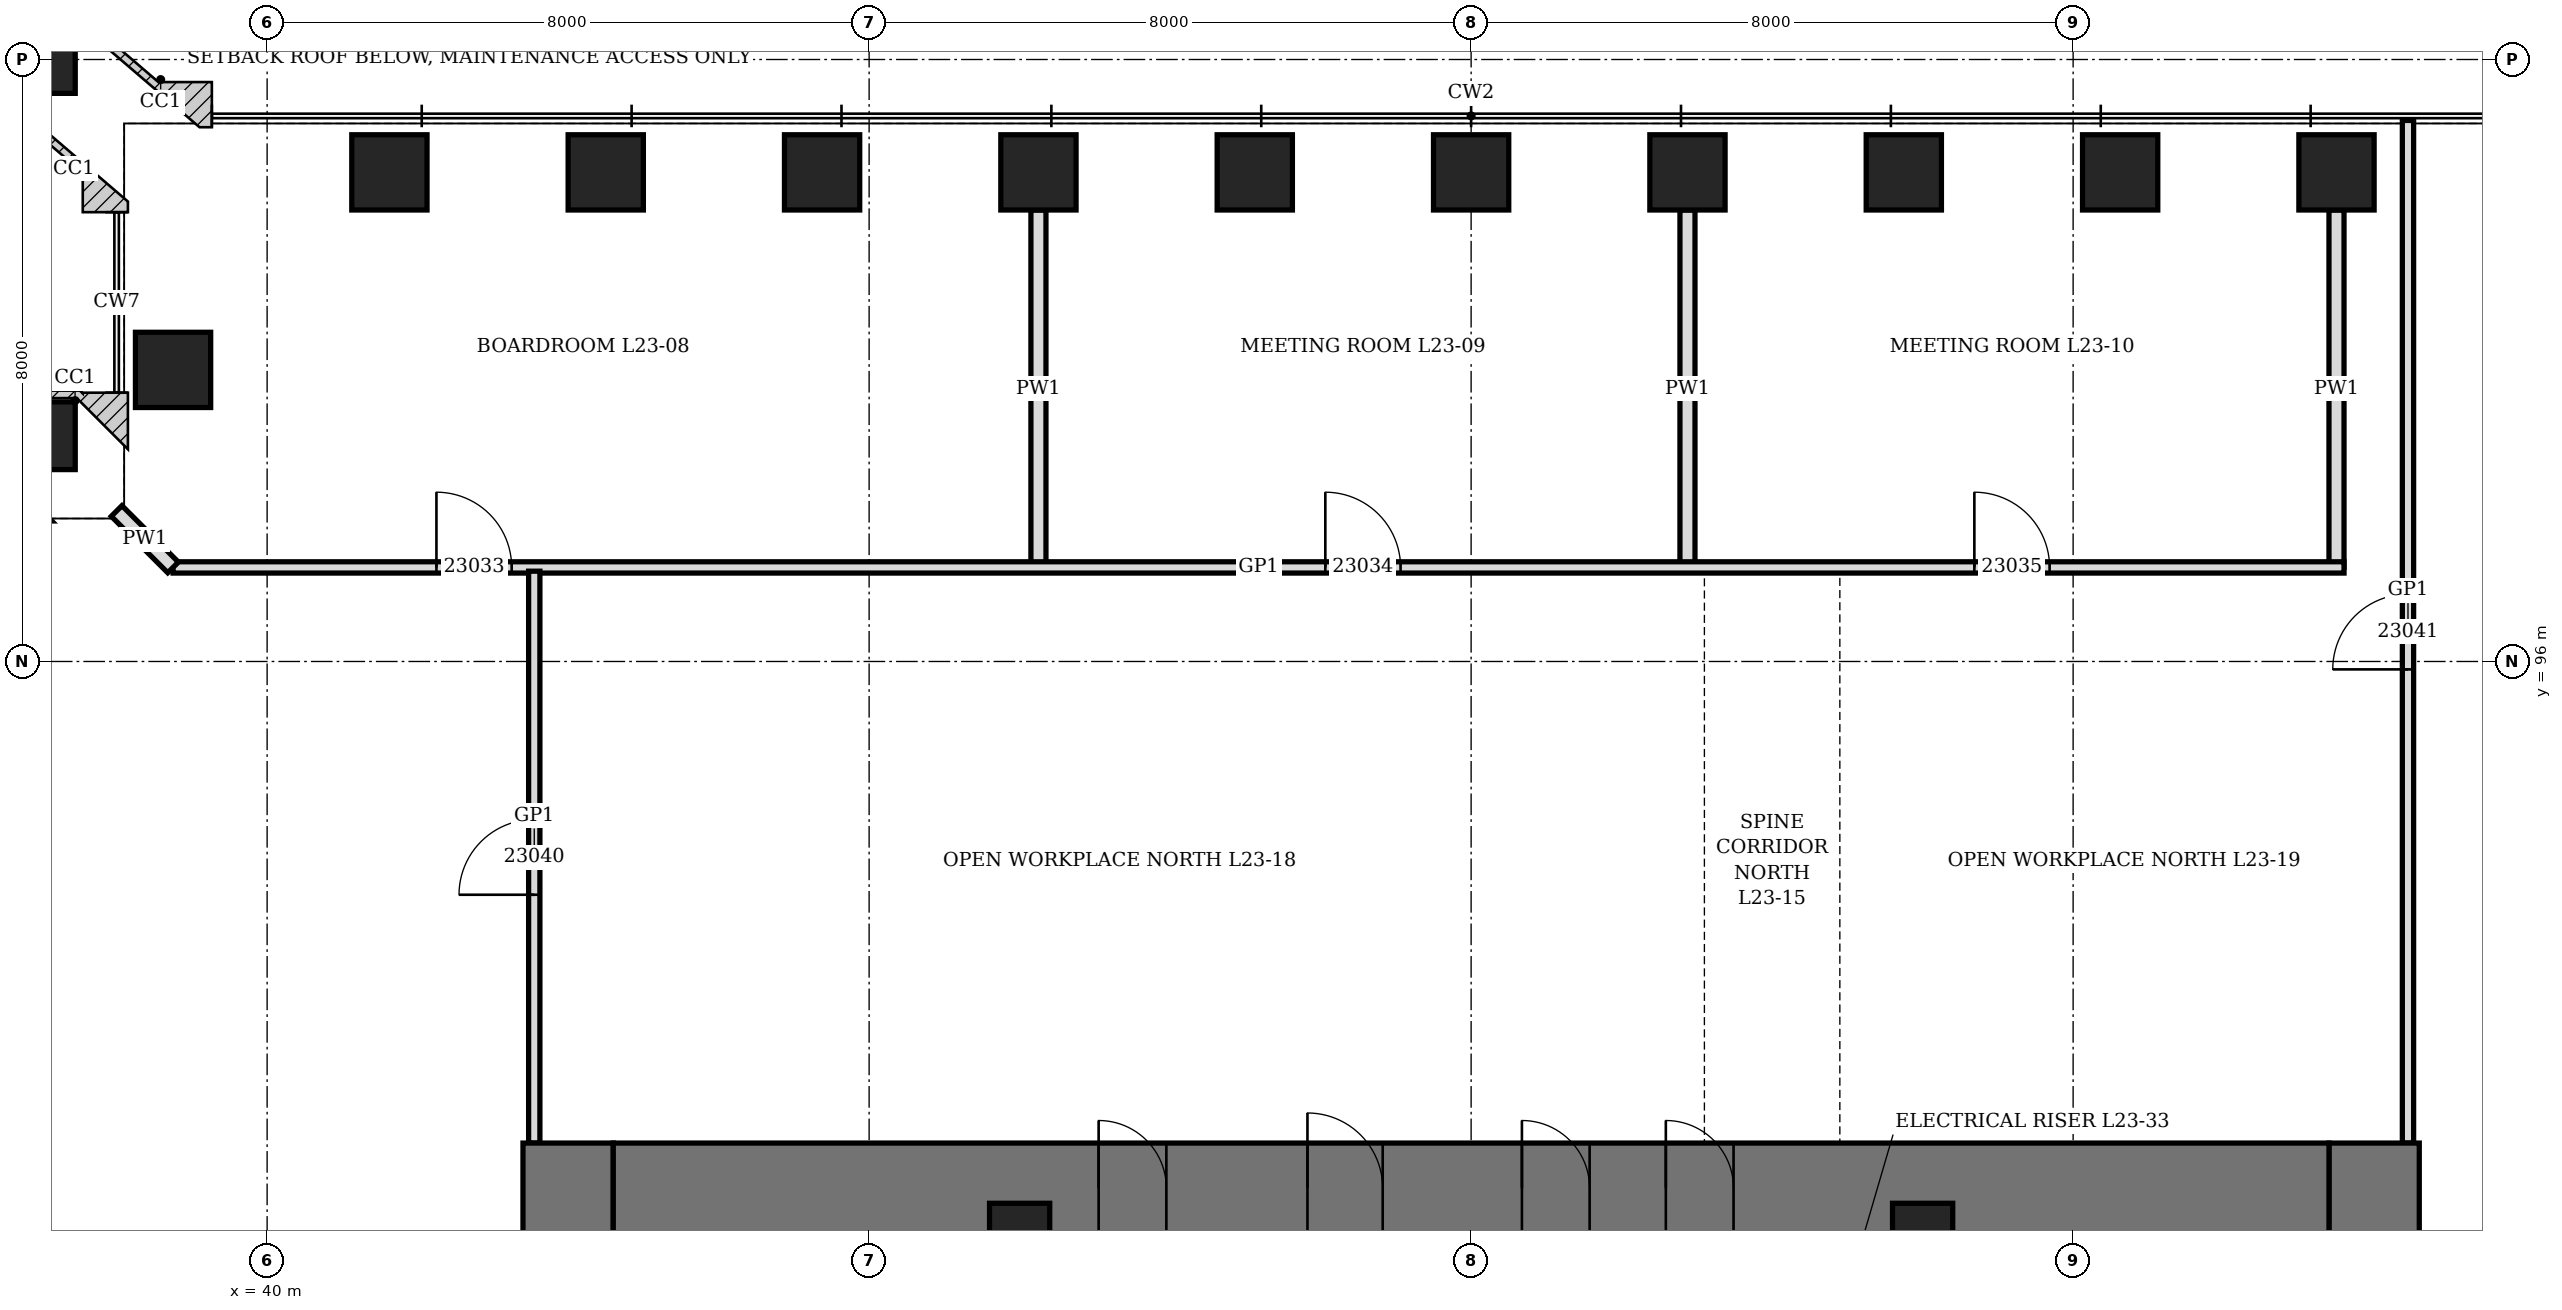
"""IFC4 building model, lengths in metres.
Left out: names, types, materials, properties, quantities, classifications, styles, units other than length and angle.
Written with IfcOpenShell. Run it as: python <this file> out.ifc"""

import sys

from ifc_helpers import new_model, si_unit, direction, frame, frame_2d, origin, origin_2d, place, context, subcontext, project, spatial, rectangle, hollow_rectangle, extrude, clip, halfspace, element, fill, save


model = new_model("IFC4")
c1 = context("Model", 3, precision=1e-05, world=origin(), true_north=direction((0.0, 1.0)))
c2 = subcontext(c1, "Body", "Model", "MODEL_VIEW")
j1 = project(units=[si_unit("LENGTHUNIT", "METRE"), si_unit("PLANEANGLEUNIT", "RADIAN")], contexts=[c1])
p1 = place(None, origin())
s1 = spatial("IfcSite", under=j1, at=p1, CompositionType="ELEMENT")
p2 = place(p1, origin())
s2 = spatial("IfcBuilding", under=s1, at=p2, CompositionType="ELEMENT")
p3 = place(p2, frame((0.0, 0.0, 108.1)))
s3 = spatial("IfcBuildingStorey", under=s2, at=p3, CompositionType="ELEMENT", Elevation=108.1)
for number, where, z_axis, x_axis in (
    (1, (67.5, 102.5, -0.25), (0.0, 0.0, 1.0), (1.0, 0.0, 0.0)),
    (2, (64.625, 102.5, -0.25), (0.0, 0.0, 1.0), (1.0, 0.0, 0.0)),
    (3, (61.75, 102.5, -0.25), (0.0, 0.0, 1.0), (1.0, 0.0, 0.0)),
    (4, (58.875, 102.5, -0.25), (0.0, 0.0, 1.0), (1.0, 0.0, 0.0)),
    (5, (56.0, 102.5, -0.25), (0.0, 0.0, 1.0), (1.0, 0.0, 0.0)),
    (6, (53.125, 102.5, -0.25), (0.0, 0.0, 1.0), (1.0, 0.0, 0.0)),
    (7, (50.25, 102.5, -0.25), (0.0, 0.0, 1.0), (1.0, 0.0, 0.0)),
    (8, (47.375, 102.5, -0.25), (0.0, 0.0, 1.0), (1.0, 0.0, 0.0)),
    (9, (44.5, 102.5, -0.25), (0.0, 0.0, 1.0), (1.0, 0.0, 0.0)),
    (10, (41.625, 102.5, -0.25), (0.0, 0.0, 1.0), (1.0, 0.0, 0.0)),
):
    element("IfcColumn", number, at=place(p3, frame(where, z_axis=z_axis, x_axis=x_axis)), inside=s3, PredefinedType="COLUMN", context=c2, shape_type="SweptSolid", body=[
        extrude(hollow_rectangle(XDim=1.0, YDim=1.0, WallThickness=0.35, at=origin_2d()), origin(), (0.0, 0.0, 1.0), 4.45),
    ])
p4 = place(p3, frame((37.0, 104.0, -0.25), z_axis=(0.349200787792, -0.299314960964, 0.887957974202), x_axis=(0.650791373456, 0.759256602365, 0.0)))
e11 = element("IfcColumn", 11, at=p4, inside=s3, PredefinedType="COLUMN", context=c2, shape_type="Clipping", body=[
    clip(clip(extrude(hollow_rectangle(XDim=0.9, YDim=0.9, WallThickness=0.2, at=origin_2d()), origin(), (0.0, 0.0, 1.0), 5.011), halfspace(frame((0.0, 0.0, 0.235), z_axis=(0.0, 0.0, 1.0), x_axis=(1.0, 0.0, 0.0)), True)), halfspace(frame((0.0, 0.0, 4.776), z_axis=(0.0, 0.0, -1.0), x_axis=(1.0, 0.0, 0.0)), True)),
])
p5 = place(p3, frame((38.75, 99.875, -0.25), z_axis=(0.0, 0.0, 1.0), x_axis=(0.0, 1.0, 0.0)))
e12 = element("IfcColumn", 12, at=p5, inside=s3, PredefinedType="COLUMN", context=c2, shape_type="SweptSolid", body=[
    extrude(hollow_rectangle(XDim=1.0, YDim=1.0, WallThickness=0.35, at=origin_2d()), origin(), (0.0, 0.0, 1.0), 4.45),
])
p6 = place(p3, frame((37.0, 99.0, -0.25), z_axis=(0.343685624304, -0.343685624304, 0.873933855216), x_axis=(0.707106781187, 0.707106781187, 0.0)))
e13 = element("IfcColumn", 13, at=p6, inside=s3, PredefinedType="COLUMN", context=c2, shape_type="Clipping", body=[
    clip(clip(extrude(hollow_rectangle(XDim=0.9, YDim=0.9, WallThickness=0.2, at=origin_2d()), origin(), (0.0, 0.0, 1.0), 5.092), halfspace(frame((0.0, 0.0, 0.253), z_axis=(0.0, 0.0, 1.0), x_axis=(1.0, 0.0, 0.0)), True)), halfspace(frame((0.0, 0.0, 4.839), z_axis=(0.0, 0.0, -1.0), x_axis=(1.0, 0.0, 0.0)), True)),
])
p7 = place(p3, frame((44.0, 70.4, 0.0), z_axis=(0.0, 0.0, 1.0), x_axis=(0.0, 1.0, 0.0)))
e14 = element("IfcWall", 14, at=p7, inside=s3, PredefinedType="SHEAR", context=c2, shape_type="SweptSolid", body=[
    extrude(rectangle(XDim=19.2, YDim=1.2, at=frame_2d((9.6, 0.0))), origin(), (0.0, 0.0, 1.0), 4.2),
])
p8 = place(p7, frame((8.6, 0.0, 0.0)))
e15 = element("IfcOpeningElement", 15, at=p8, cuts=e14, PredefinedType="OPENING", context=c2, shape_type="SweptSolid", body=[
    extrude(rectangle(XDim=2.0, YDim=2.4, at=frame_2d((1.0, 1.2))), frame((0.0, 0.61, 0.0), z_axis=(0.0, -1.0, 0.0), x_axis=(1.0, 0.0, 0.0)), (0.0, 0.0, 1.0), 1.22),
])
p9 = place(p3, frame((68.0, 70.4, 0.0), z_axis=(0.0, 0.0, 1.0), x_axis=(0.0, 1.0, 0.0)))
e16 = element("IfcWall", 16, at=p9, inside=s3, PredefinedType="SHEAR", context=c2, shape_type="SweptSolid", body=[
    extrude(rectangle(XDim=19.2, YDim=1.2, at=frame_2d((9.6, 0.0))), origin(), (0.0, 0.0, 1.0), 4.2),
])
p10 = place(p9, frame((8.6, 0.0, 0.0)))
e17 = element("IfcOpeningElement", 17, at=p10, cuts=e16, PredefinedType="OPENING", context=c2, shape_type="SweptSolid", body=[
    extrude(rectangle(XDim=2.0, YDim=2.4, at=frame_2d((1.0, 1.2))), frame((0.0, 0.61, 0.0), z_axis=(0.0, -1.0, 0.0), x_axis=(1.0, 0.0, 0.0)), (0.0, 0.0, 1.0), 1.22),
])
p11 = place(p3, frame((44.6, 89.0, 0.0), z_axis=(0.0, 0.0, 1.0), x_axis=(1.0, 0.0, 0.0)))
e18 = element("IfcWall", 18, at=p11, inside=s3, PredefinedType="SHEAR", context=c2, shape_type="SweptSolid", body=[
    extrude(rectangle(XDim=22.8, YDim=1.2, at=frame_2d((11.4, 0.0))), origin(), (0.0, 0.0, 1.0), 4.2),
])
p12 = place(p11, frame((9.225, 0.0, 0.0)))
e19 = element("IfcOpeningElement", 19, at=p12, cuts=e18, PredefinedType="OPENING", context=c2, shape_type="SweptSolid", body=[
    extrude(rectangle(XDim=1.0, YDim=2.1, at=frame_2d((0.5, 1.05))), frame((0.0, 0.61, 0.0), z_axis=(0.0, -1.0, 0.0), x_axis=(1.0, 0.0, 0.0)), (0.0, 0.0, 1.0), 1.22),
])
p13 = place(p11, frame((6.45, 0.0, 0.0)))
e20 = element("IfcOpeningElement", 20, at=p13, cuts=e18, PredefinedType="OPENING", context=c2, shape_type="SweptSolid", body=[
    extrude(rectangle(XDim=0.9, YDim=2.1, at=frame_2d((0.45, 1.05))), frame((0.0, 0.61, 0.0), z_axis=(0.0, -1.0, 0.0), x_axis=(1.0, 0.0, 0.0)), (0.0, 0.0, 1.0), 1.22),
])
p14 = place(p11, frame((12.075, 0.0, 0.0)))
e21 = element("IfcOpeningElement", 21, at=p14, cuts=e18, PredefinedType="OPENING", context=c2, shape_type="SweptSolid", body=[
    extrude(rectangle(XDim=0.9, YDim=2.1, at=frame_2d((0.45, 1.05))), frame((0.0, 0.61, 0.0), z_axis=(0.0, -1.0, 0.0), x_axis=(1.0, 0.0, 0.0)), (0.0, 0.0, 1.0), 1.22),
])
p15 = place(p11, frame((13.988, 0.0, 0.0)))
e22 = element("IfcOpeningElement", 22, at=p15, cuts=e18, PredefinedType="OPENING", context=c2, shape_type="SweptSolid", body=[
    extrude(rectangle(XDim=0.9, YDim=2.1, at=frame_2d((0.45, 1.05))), frame((0.0, 0.61, 0.0), z_axis=(0.0, -1.0, 0.0), x_axis=(1.0, 0.0, 0.0)), (0.0, 0.0, 1.0), 1.22),
])
for number, where, z_axis, x_axis in (
    (23, (50.0, 88.4, 0.0), (0.0, 0.0, 1.0), (1.0, 0.0, 0.0)),
    (24, (62.0, 88.4, 0.0), (0.0, 0.0, 1.0), (1.0, 0.0, 0.0)),
):
    element("IfcColumn", number, at=place(p3, frame(where, z_axis=z_axis, x_axis=x_axis)), inside=s3, PredefinedType="COLUMN", context=c2, shape_type="SweptSolid", body=[
        extrude(hollow_rectangle(XDim=0.8, YDim=0.8, WallThickness=0.1, at=origin_2d()), origin(), (0.0, 0.0, 1.0), 4.2),
    ])
for number, where, z_axis, x_axis in (
    (25, (50.25, 97.25, 0.0), (0.0, 0.0, 1.0), (0.0, 1.0, 0.0)),
    (26, (58.875, 97.25, 0.0), (0.0, 0.0, 1.0), (0.0, 1.0, 0.0)),
):
    element("IfcWall", number, at=place(p3, frame(where, z_axis=z_axis, x_axis=x_axis)), inside=s3, PredefinedType="PARTITIONING", context=c2, shape_type="SweptSolid", body=[
        extrude(rectangle(XDim=4.75, YDim=0.2, at=frame_2d((2.375, 0.0))), origin(), (0.0, 0.0, 1.0), 3.278),
    ])
p16 = place(p3, frame((67.5, 97.25, 0.0), z_axis=(0.0, 0.0, 1.0), x_axis=(0.0, 1.0, 0.0)))
e27 = element("IfcWall", 27, at=p16, inside=s3, PredefinedType="PARTITIONING", context=c2, shape_type="SweptSolid", body=[
    extrude(rectangle(XDim=4.75, YDim=0.2, at=frame_2d((2.375, 0.0))), origin(), (0.0, 0.0, 1.0), 2.74),
])
p17 = place(p3, frame((38.75, 97.25, 0.0), z_axis=(0.0, 0.0, 1.0), x_axis=(1.0, 0.0, 0.0)))
e28 = element("IfcWall", 28, at=p17, inside=s3, PredefinedType="PARTITIONING", context=c2, shape_type="SweptSolid", body=[
    extrude(rectangle(XDim=28.85, YDim=0.15, at=frame_2d((14.425, 0.0))), origin(), (0.0, 0.0, 1.0), 4.04),
])
p18 = place(p17, frame((3.5, 0.0, 0.0)))
e29 = element("IfcOpeningElement", 29, at=p18, cuts=e28, PredefinedType="OPENING", context=c2, shape_type="SweptSolid", body=[
    extrude(rectangle(XDim=1.0, YDim=2.4, at=frame_2d((0.5, 1.2))), frame((0.0, 0.085, 0.0), z_axis=(0.0, -1.0, 0.0), x_axis=(1.0, 0.0, 0.0)), (0.0, 0.0, 1.0), 0.17),
])
p19 = place(p17, frame((15.312, 0.0, 0.0)))
e30 = element("IfcOpeningElement", 30, at=p19, cuts=e28, PredefinedType="OPENING", context=c2, shape_type="SweptSolid", body=[
    extrude(rectangle(XDim=1.0, YDim=2.4, at=frame_2d((0.5, 1.2))), frame((0.0, 0.085, 0.0), z_axis=(0.0, -1.0, 0.0), x_axis=(1.0, 0.0, 0.0)), (0.0, 0.0, 1.0), 0.17),
])
p20 = place(p17, frame((23.938, 0.0, 0.0)))
e31 = element("IfcOpeningElement", 31, at=p20, cuts=e28, PredefinedType="OPENING", context=c2, shape_type="SweptSolid", body=[
    extrude(rectangle(XDim=1.0, YDim=2.4, at=frame_2d((0.5, 1.2))), frame((0.0, 0.085, 0.0), z_axis=(0.0, -1.0, 0.0), x_axis=(1.0, 0.0, 0.0)), (0.0, 0.0, 1.0), 0.17),
])
p21 = place(p3, frame((43.55, 89.6, 0.0), z_axis=(0.0, 0.0, 1.0), x_axis=(0.0, 1.0, 0.0)))
e32 = element("IfcWall", 32, at=p21, inside=s3, PredefinedType="PARTITIONING", context=c2, shape_type="SweptSolid", body=[
    extrude(rectangle(XDim=7.6, YDim=0.15, at=frame_2d((3.8, 0.0))), origin(), (0.0, 0.0, 1.0), 4.04),
])
p22 = place(p21, frame((3.3, 0.0, 0.0)))
e33 = element("IfcOpeningElement", 33, at=p22, cuts=e32, PredefinedType="OPENING", context=c2, shape_type="SweptSolid", body=[
    extrude(rectangle(XDim=1.0, YDim=2.4, at=frame_2d((0.5, 1.2))), frame((0.0, 0.085, 0.0), z_axis=(0.0, -1.0, 0.0), x_axis=(1.0, 0.0, 0.0)), (0.0, 0.0, 1.0), 0.17),
])
p23 = place(p3, frame((68.45, 89.6, 0.0), z_axis=(0.0, 0.0, 1.0), x_axis=(0.0, 1.0, 0.0)))
e34 = element("IfcWall", 34, at=p23, inside=s3, PredefinedType="PARTITIONING", context=c2, shape_type="SweptSolid", body=[
    extrude(rectangle(XDim=13.59, YDim=0.15, at=frame_2d((6.795, 0.0))), origin(), (0.0, 0.0, 1.0), 4.04),
])
p24 = place(p23, frame((6.295, 0.0, 0.0)))
e35 = element("IfcOpeningElement", 35, at=p24, cuts=e34, PredefinedType="OPENING", context=c2, shape_type="SweptSolid", body=[
    extrude(rectangle(XDim=1.0, YDim=2.4, at=frame_2d((0.5, 1.2))), frame((0.0, 0.085, 0.0), z_axis=(0.0, -1.0, 0.0), x_axis=(1.0, 0.0, 0.0)), (0.0, 0.0, 1.0), 0.17),
])
p25 = place(p3, frame((38.75, 97.25, 0.0), z_axis=(0.0, 0.0, 1.0), x_axis=(-0.707106781187, 0.707106781187, 0.0)))
e36 = element("IfcWall", 36, at=p25, inside=s3, PredefinedType="PARTITIONING", context=c2, shape_type="SweptSolid", body=[
    extrude(rectangle(XDim=1.061, YDim=0.2, at=frame_2d((0.53, 0.0))), origin(), (0.0, 0.0, 1.0), 4.04),
])
p26 = place(p12, origin())
e37 = element("IfcDoor", 37, at=p26, inside=s3, OperationType="SINGLE_SWING_LEFT", PredefinedType="DOOR", context=c2, shape_type="SweptSolid", body=[
    extrude(rectangle(XDim=1.0, YDim=2.1, at=frame_2d((0.5, 1.05))), frame((0.0, 0.35, 0.0), z_axis=(0.0, -1.0, 0.0), x_axis=(1.0, 0.0, 0.0)), (0.0, 0.0, 1.0), 0.7),
])
fill(e19, e37)
p27 = place(p13, origin())
e38 = element("IfcDoor", 38, at=p27, inside=s3, OperationType="SINGLE_SWING_LEFT", PredefinedType="DOOR", context=c2, shape_type="SweptSolid", body=[
    extrude(rectangle(XDim=0.9, YDim=2.1, at=frame_2d((0.45, 1.05))), frame((0.0, 0.35, 0.0), z_axis=(0.0, -1.0, 0.0), x_axis=(1.0, 0.0, 0.0)), (0.0, 0.0, 1.0), 0.7),
])
fill(e20, e38)
p28 = place(p14, origin())
e39 = element("IfcDoor", 39, at=p28, inside=s3, OperationType="SINGLE_SWING_LEFT", PredefinedType="DOOR", context=c2, shape_type="SweptSolid", body=[
    extrude(rectangle(XDim=0.9, YDim=2.1, at=frame_2d((0.45, 1.05))), frame((0.0, 0.35, 0.0), z_axis=(0.0, -1.0, 0.0), x_axis=(1.0, 0.0, 0.0)), (0.0, 0.0, 1.0), 0.7),
])
fill(e21, e39)
p29 = place(p15, origin())
e40 = element("IfcDoor", 40, at=p29, inside=s3, OperationType="SINGLE_SWING_LEFT", PredefinedType="DOOR", context=c2, shape_type="SweptSolid", body=[
    extrude(rectangle(XDim=0.9, YDim=2.1, at=frame_2d((0.45, 1.05))), frame((0.0, 0.35, 0.0), z_axis=(0.0, -1.0, 0.0), x_axis=(1.0, 0.0, 0.0)), (0.0, 0.0, 1.0), 0.7),
])
fill(e22, e40)
p30 = place(p18, origin())
e41 = element("IfcDoor", 41, at=p30, inside=s3, OperationType="SINGLE_SWING_RIGHT", PredefinedType="DOOR", context=c2, shape_type="SweptSolid", body=[
    extrude(rectangle(XDim=1.0, YDim=2.4, at=frame_2d((0.5, 1.2))), frame((0.0, 0.075, 0.0), z_axis=(0.0, -1.0, 0.0), x_axis=(1.0, 0.0, 0.0)), (0.0, 0.0, 1.0), 0.149),
])
fill(e29, e41)
p31 = place(p19, origin())
e42 = element("IfcDoor", 42, at=p31, inside=s3, OperationType="SINGLE_SWING_RIGHT", PredefinedType="DOOR", context=c2, shape_type="SweptSolid", body=[
    extrude(rectangle(XDim=1.0, YDim=2.4, at=frame_2d((0.5, 1.2))), frame((0.0, 0.075, 0.0), z_axis=(0.0, -1.0, 0.0), x_axis=(1.0, 0.0, 0.0)), (0.0, 0.0, 1.0), 0.149),
])
fill(e30, e42)
p32 = place(p20, origin())
e43 = element("IfcDoor", 43, at=p32, inside=s3, OperationType="SINGLE_SWING_RIGHT", PredefinedType="DOOR", context=c2, shape_type="SweptSolid", body=[
    extrude(rectangle(XDim=1.0, YDim=2.4, at=frame_2d((0.5, 1.2))), frame((0.0, 0.075, 0.0), z_axis=(0.0, -1.0, 0.0), x_axis=(1.0, 0.0, 0.0)), (0.0, 0.0, 1.0), 0.149),
])
fill(e31, e43)
p33 = place(p22, origin())
e44 = element("IfcDoor", 44, at=p33, inside=s3, OperationType="SINGLE_SWING_RIGHT", PredefinedType="DOOR", context=c2, shape_type="SweptSolid", body=[
    extrude(rectangle(XDim=1.0, YDim=2.4, at=frame_2d((0.5, 1.2))), frame((0.0, 0.075, 0.0), z_axis=(0.0, -1.0, 0.0), x_axis=(1.0, 0.0, 0.0)), (0.0, 0.0, 1.0), 0.149),
])
fill(e33, e44)
p34 = place(p24, origin())
e45 = element("IfcDoor", 45, at=p34, inside=s3, OperationType="SINGLE_SWING_RIGHT", PredefinedType="DOOR", context=c2, shape_type="SweptSolid", body=[
    extrude(rectangle(XDim=1.0, YDim=2.4, at=frame_2d((0.5, 1.2))), frame((0.0, 0.075, 0.0), z_axis=(0.0, -1.0, 0.0), x_axis=(1.0, 0.0, 0.0)), (0.0, 0.0, 1.0), 0.149),
])
fill(e35, e45)
save(model, sys.argv[1])
